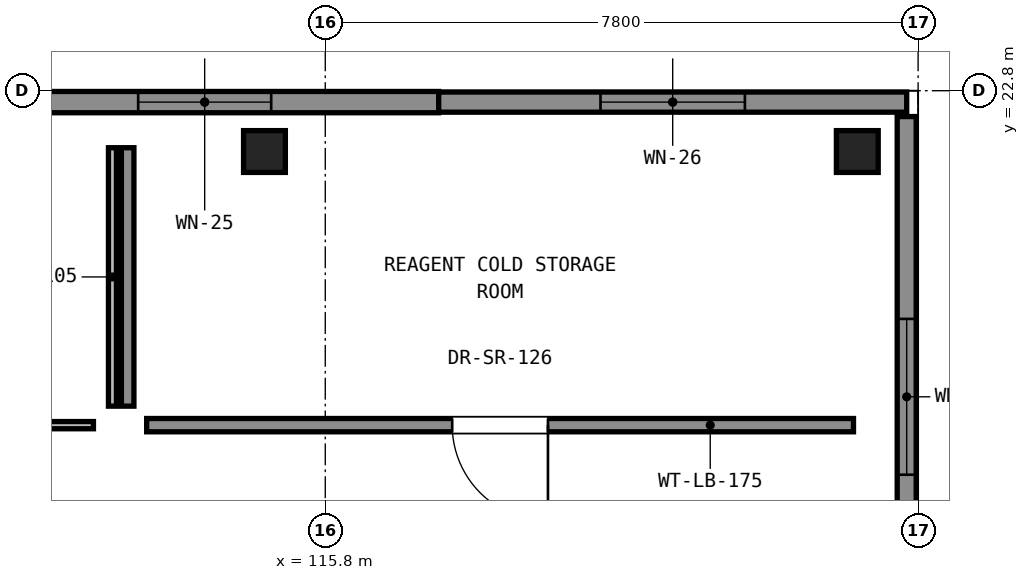
"""IFC4 building model, lengths in metres.
Left out: names, types, materials, properties, quantities, classifications, styles, units other than length and angle.
Written with IfcOpenShell. Run it as: python <this file> out.ifc"""

import sys

from ifc_helpers import new_model, si_unit, direction, frame, frame_2d, origin, origin_2d, place, context, subcontext, project, spatial, rectangle, extrude, element, fill, save


model = new_model("IFC4")
c1 = context("Model", 3, precision=1e-05, world=origin(), true_north=direction((0.0, 1.0)))
c2 = subcontext(c1, "Body", "Model", "MODEL_VIEW")
j1 = project(units=[si_unit("LENGTHUNIT", "METRE"), si_unit("PLANEANGLEUNIT", "RADIAN")], contexts=[c1])
p1 = place(None, origin())
s1 = spatial("IfcSite", under=j1, at=p1, CompositionType="ELEMENT")
p2 = place(p1, origin())
s2 = spatial("IfcBuilding", under=s1, at=p2, CompositionType="ELEMENT")
p3 = place(p2, frame((0.0, 0.0, 5.1)))
s3 = spatial("IfcBuildingStorey", under=s2, at=p3, CompositionType="ELEMENT", Elevation=5.1)
for number, where, z_axis, x_axis in (
    (1, (115.0, 22.0, 0.0), (0.0, 0.0, 1.0), (1.0, 0.0, 0.0)),
    (2, (122.8, 22.0, 0.0), (0.0, 0.0, 1.0), (1.0, 0.0, 0.0)),
):
    element("IfcColumn", number, at=place(p3, frame(where, z_axis=z_axis, x_axis=x_axis)), inside=s3, PredefinedType="COLUMN", context=c2, shape_type="SweptSolid", body=[
        extrude(rectangle(XDim=0.55, YDim=0.55, at=origin_2d()), origin(), (0.0, 0.0, 1.0), 4.42),
    ])
p4 = place(p3, frame((111.135, 22.65, 0.0), z_axis=(0.0, 0.0, 1.0), x_axis=(1.0, 0.0, 0.0)))
e3 = element("IfcWall", 3, at=p4, inside=s3, PredefinedType="SOLIDWALL", context=c2, shape_type="SweptSolid", body=[
    extrude(rectangle(XDim=6.158, YDim=0.28, at=frame_2d((3.079, 0.0))), origin(), (0.0, 0.0, 1.0), 4.105),
])
p5 = place(p4, frame((2.204, 0.0, 0.9)))
e4 = element("IfcOpeningElement", 4, at=p5, cuts=e3, PredefinedType="OPENING", context=c2, shape_type="SweptSolid", body=[
    extrude(rectangle(XDim=1.75, YDim=2.0, at=frame_2d((0.875, 1.0))), frame((0.0, 0.15, 0.0), z_axis=(0.0, -1.0, 0.0), x_axis=(1.0, 0.0, 0.0)), (0.0, 0.0, 1.0), 0.3),
])
p6 = place(p3, frame((117.292, 22.65, 0.0), z_axis=(0.0, 0.0, 1.0), x_axis=(1.0, 0.0, 0.0)))
e5 = element("IfcWall", 5, at=p6, inside=s3, PredefinedType="SOLIDWALL", context=c2, shape_type="SweptSolid", body=[
    extrude(rectangle(XDim=6.158, YDim=0.265, at=frame_2d((3.079, 0.0))), origin(), (0.0, 0.0, 1.0), 4.105),
])
p7 = place(p6, frame((2.129, 0.0, 0.9)))
e6 = element("IfcOpeningElement", 6, at=p7, cuts=e5, PredefinedType="OPENING", context=c2, shape_type="SweptSolid", body=[
    extrude(rectangle(XDim=1.9, YDim=2.0, at=frame_2d((0.95, 1.0))), frame((0.0, 0.142, 0.0), z_axis=(0.0, -1.0, 0.0), x_axis=(1.0, 0.0, 0.0)), (0.0, 0.0, 1.0), 0.285),
])
p8 = place(p3, frame((123.45, 22.46, 0.0), z_axis=(0.0, 0.0, 1.0), x_axis=(0.0, -1.0, 0.0)))
e7 = element("IfcWall", 7, at=p8, inside=s3, PredefinedType="SOLIDWALL", context=c2, shape_type="SweptSolid", body=[
    extrude(rectangle(XDim=7.373, YDim=0.25, at=frame_2d((3.687, 0.0))), origin(), (0.0, 0.0, 1.0), 4.105),
])
p9 = place(p8, frame((2.662, 0.0, 0.9)))
e8 = element("IfcOpeningElement", 8, at=p9, cuts=e7, PredefinedType="OPENING", context=c2, shape_type="SweptSolid", body=[
    extrude(rectangle(XDim=2.05, YDim=2.0, at=frame_2d((1.025, 1.0))), frame((0.0, 0.135, 0.0), z_axis=(0.0, -1.0, 0.0), x_axis=(1.0, 0.0, 0.0)), (0.0, 0.0, 1.0), 0.27),
])
p10 = place(p3, frame((113.0, 22.05, 0.0), z_axis=(0.0, 0.0, 1.0), x_axis=(0.0, -1.0, 0.0)))
e9 = element("IfcWall", 9, at=p10, inside=s3, PredefinedType="PARTITIONING", context=c2, shape_type="SweptSolid", body=[
    extrude(rectangle(XDim=3.4, YDim=0.105, at=frame_2d((1.7, 0.0))), origin(), (0.0, 0.0, 1.0), 3.555),
])
p11 = place(p3, frame((112.75, 18.4, 0.0), z_axis=(0.0, 0.0, 1.0), x_axis=(-1.0, 0.0, 0.0)))
e10 = element("IfcWall", 10, at=p11, inside=s3, PredefinedType="PARTITIONING", context=c2, shape_type="SweptSolid", body=[
    extrude(rectangle(XDim=8.3, YDim=0.095, at=frame_2d((4.15, 0.0))), origin(), (0.0, 0.0, 1.0), 3.555),
])
p12 = place(p11, frame((3.675, 0.0, 0.0)))
e11 = element("IfcOpeningElement", 11, at=p12, cuts=e10, PredefinedType="OPENING", context=c2, shape_type="SweptSolid", body=[
    extrude(rectangle(XDim=0.95, YDim=2.15, at=frame_2d((0.475, 1.075))), frame((0.0, 0.057, 0.0), z_axis=(0.0, -1.0, 0.0), x_axis=(1.0, 0.0, 0.0)), (0.0, 0.0, 1.0), 0.115),
])
p13 = place(p3, frame((122.75, 18.4, 0.0), z_axis=(0.0, 0.0, 1.0), x_axis=(-1.0, 0.0, 0.0)))
e12 = element("IfcWall", 12, at=p13, inside=s3, PredefinedType="PARTITIONING", context=c2, shape_type="SweptSolid", body=[
    extrude(rectangle(XDim=9.3, YDim=0.175, at=frame_2d((4.65, 0.0))), origin(), (0.0, 0.0, 1.0), 3.405),
])
p14 = place(p13, frame((4.02, 0.0, 0.0)))
e13 = element("IfcOpeningElement", 13, at=p14, cuts=e12, PredefinedType="OPENING", context=c2, shape_type="SweptSolid", body=[
    extrude(rectangle(XDim=1.26, YDim=2.15, at=frame_2d((0.63, 1.075))), frame((0.0, 0.097, 0.0), z_axis=(0.0, -1.0, 0.0), x_axis=(1.0, 0.0, 0.0)), (0.0, 0.0, 1.0), 0.195),
])
p15 = place(p3, frame((113.2, 18.65, 0.0), z_axis=(0.0, 0.0, 1.0), x_axis=(0.0, 1.0, 0.0)))
e14 = element("IfcWall", 14, at=p15, inside=s3, PredefinedType="PARTITIONING", context=c2, shape_type="SweptSolid", body=[
    extrude(rectangle(XDim=3.4, YDim=0.165, at=frame_2d((1.7, 0.0))), origin(), (0.0, 0.0, 1.0), 3.555),
])
p16 = place(p5, origin())
e15 = element("IfcWindow", 15, at=p16, inside=s3, PartitioningType="SINGLE_PANEL", PredefinedType="WINDOW", context=c2, shape_type="SweptSolid", body=[
    extrude(rectangle(XDim=1.75, YDim=2.0, at=frame_2d((0.875, 1.0))), frame((0.0, 0.03, 0.0), z_axis=(0.0, -1.0, 0.0), x_axis=(1.0, 0.0, 0.0)), (0.0, 0.0, 1.0), 0.06),
])
fill(e4, e15)
p17 = place(p7, origin())
e16 = element("IfcWindow", 16, at=p17, inside=s3, PartitioningType="SINGLE_PANEL", PredefinedType="WINDOW", context=c2, shape_type="SweptSolid", body=[
    extrude(rectangle(XDim=1.9, YDim=2.0, at=frame_2d((0.95, 1.0))), frame((0.0, 0.03, 0.0), z_axis=(0.0, -1.0, 0.0), x_axis=(1.0, 0.0, 0.0)), (0.0, 0.0, 1.0), 0.06),
])
fill(e6, e16)
p18 = place(p9, origin())
e17 = element("IfcWindow", 17, at=p18, inside=s3, PartitioningType="SINGLE_PANEL", PredefinedType="WINDOW", context=c2, shape_type="SweptSolid", body=[
    extrude(rectangle(XDim=2.05, YDim=2.0, at=frame_2d((1.025, 1.0))), frame((0.0, 0.03, 0.0), z_axis=(0.0, -1.0, 0.0), x_axis=(1.0, 0.0, 0.0)), (0.0, 0.0, 1.0), 0.06),
])
fill(e8, e17)
p19 = place(p14, origin())
e18 = element("IfcDoor", 18, at=p19, inside=s3, OperationType="SINGLE_SWING_LEFT", PredefinedType="DOOR", context=c2, shape_type="SweptSolid", body=[
    extrude(rectangle(XDim=1.26, YDim=2.15, at=frame_2d((0.63, 1.075))), frame((0.0, 0.025, 0.0), z_axis=(0.0, -1.0, 0.0), x_axis=(1.0, 0.0, 0.0)), (0.0, 0.0, 1.0), 0.05),
])
fill(e13, e18)
save(model, sys.argv[1])
